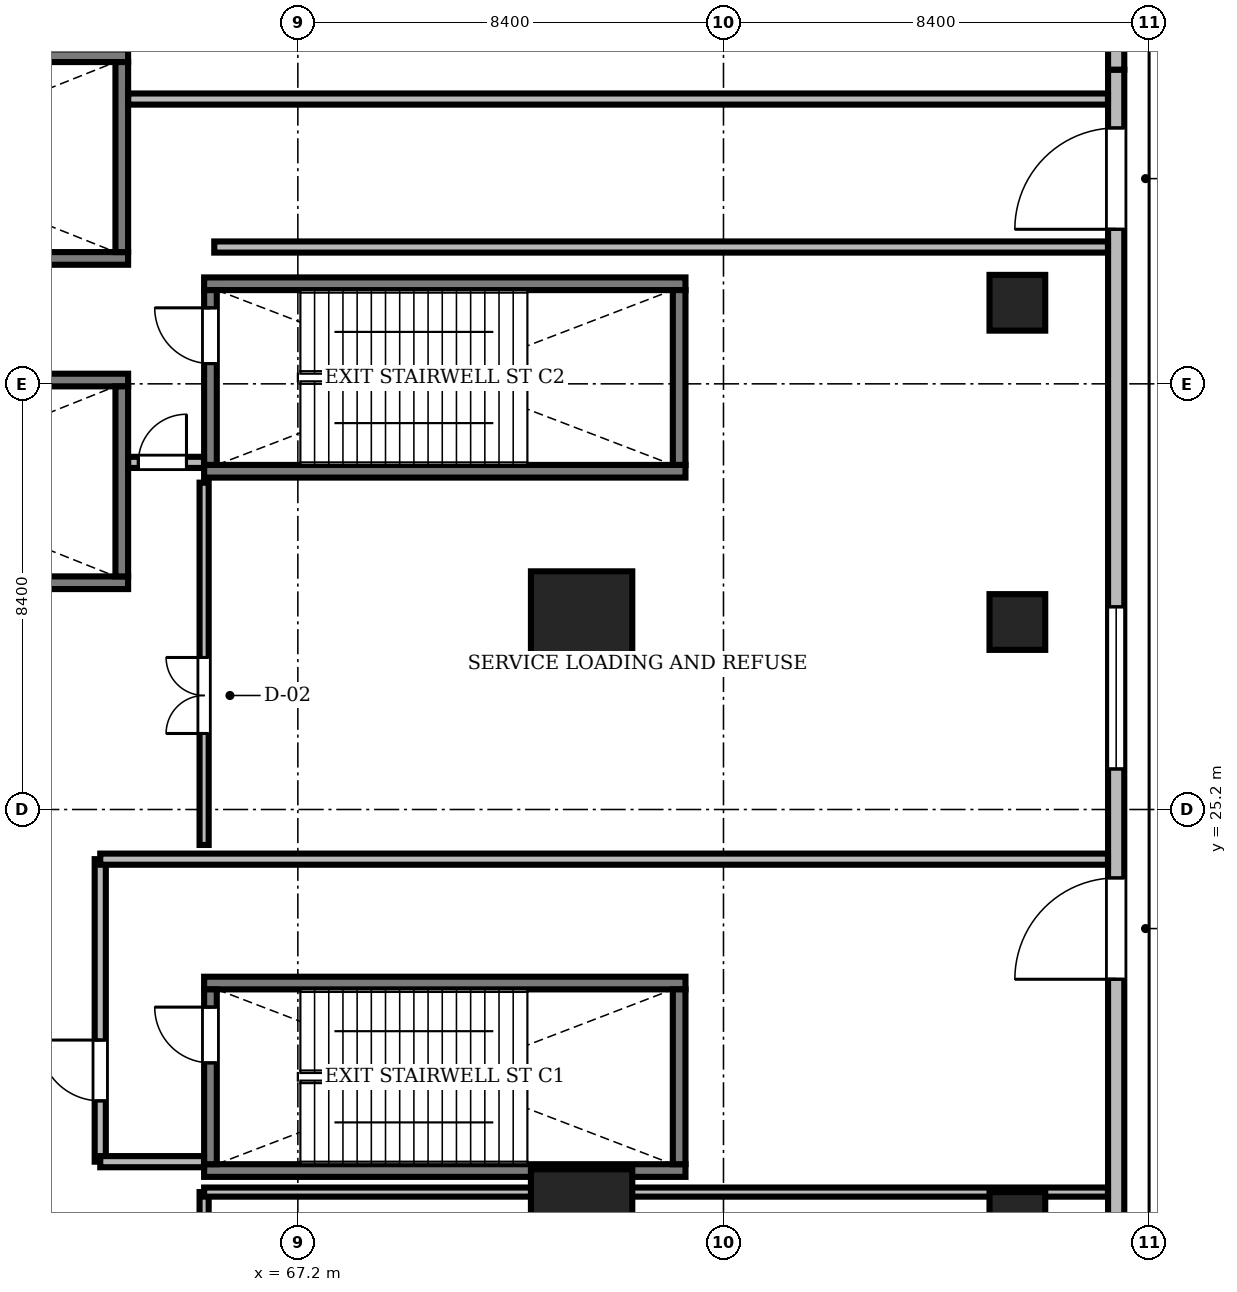
"""IFC4 building model, lengths in metres.
Left out: names, types, materials, properties, quantities, classifications, styles, units other than length and angle.
Written with IfcOpenShell. Run it as: python <this file> out.ifc"""

import sys

from ifc_helpers import new_model, si_unit, direction, frame, frame_2d, origin, origin_2d, place, context, subcontext, project, spatial, rectangle, extrude, source, transform, mapped, element, fill, save


model = new_model("IFC4")
c1 = context("Model", 3, precision=1e-05, world=origin(), true_north=direction((0.0, 1.0)))
c2 = subcontext(c1, "Body", "Model", "MODEL_VIEW")
j1 = project(units=[si_unit("LENGTHUNIT", "METRE"), si_unit("PLANEANGLEUNIT", "RADIAN")], contexts=[c1])
p1 = place(None, origin())
s1 = spatial("IfcSite", under=j1, at=p1, CompositionType="ELEMENT")
p2 = place(p1, origin())
s2 = spatial("IfcBuilding", under=s1, at=p2, CompositionType="ELEMENT")
p3 = place(p2, origin())
s3 = spatial("IfcBuildingStorey", under=s2, at=p3, CompositionType="ELEMENT", Elevation=0.0)
m1 = source(origin(), c2, "Body", "SweptSolid", [
    extrude(rectangle(XDim=2.0, YDim=2.0, at=origin_2d()), origin(), (0.0, 0.0, 1.0), 5.68),
])
for number, where, z_axis, x_axis in (
    (1, (72.8, 17.1, 0.0), (0.0, 0.0, 1.0), (1.0, 0.0, 0.0)),
    (2, (72.8, 28.9, 0.0), (0.0, 0.0, 1.0), (1.0, 0.0, 0.0)),
):
    element("IfcColumn", number, at=place(p3, frame(where, z_axis=z_axis, x_axis=x_axis)), inside=s3, PredefinedType="COLUMN", context=c2, shape_type="MappedRepresentation", body=[
        mapped(m1, transform((0.0, 0.0, 0.0), scale=1.0)),
    ])
m2 = source(origin(), c2, "Body", "SweptSolid", [
    extrude(rectangle(XDim=1.1, YDim=1.1, at=origin_2d()), origin(), (0.0, 0.0, 1.0), 5.68),
])
for number, where, z_axis, x_axis in (
    (3, (81.4, 17.1, 0.0), (0.0, 0.0, 1.0), (1.0, 0.0, 0.0)),
    (4, (81.4, 28.9, 0.0), (0.0, 0.0, 1.0), (1.0, 0.0, 0.0)),
    (5, (81.4, 35.2, 0.0), (0.0, 0.0, 1.0), (1.0, 0.0, 0.0)),
):
    element("IfcColumn", number, at=place(p3, frame(where, z_axis=z_axis, x_axis=x_axis)), inside=s3, PredefinedType="COLUMN", context=c2, shape_type="MappedRepresentation", body=[
        mapped(m2, transform((0.0, 0.0, 0.0), scale=1.0)),
    ])
m3 = source(origin(), c2, "Body", "SweptSolid", [
    extrude(rectangle(XDim=23.4, YDim=0.32, at=frame_2d((11.7, 0.0))), origin(), (0.0, 0.0, 1.0), 5.68),
])
p4 = place(p3, frame((83.35, 16.4, 0.0), z_axis=(0.0, 0.0, 1.0), x_axis=(0.0, 1.0, 0.0)))
e6 = element("IfcWall", 6, at=p4, inside=s3, PredefinedType="SOLIDWALL", context=c2, shape_type="MappedRepresentation", body=[
    mapped(m3, transform((0.0, 0.0, 0.0), scale=1.0)),
])
m4 = source(origin(), c2, "Body", "SweptSolid", [
    extrude(rectangle(XDim=2.0, YDim=2.6, at=frame_2d((1.0, 1.3))), frame((0.0, 0.17, 0.0), z_axis=(0.0, -1.0, 0.0), x_axis=(1.0, 0.0, 0.0)), (0.0, 0.0, 1.0), 0.34),
])
p5 = place(p4, frame((5.45, 0.0, 0.0)))
e7 = element("IfcOpeningElement", 7, at=p5, cuts=e6, PredefinedType="OPENING", context=c2, shape_type="MappedRepresentation", body=[
    mapped(m4, transform((0.0, 0.0, 0.0), scale=1.0)),
])
p6 = place(p4, frame((20.25, 0.0, 0.0)))
e8 = element("IfcOpeningElement", 8, at=p6, cuts=e6, PredefinedType="OPENING", context=c2, shape_type="MappedRepresentation", body=[
    mapped(m4, transform((0.0, 0.0, 0.0), scale=1.0)),
])
m5 = source(origin(), c2, "Body", "SweptSolid", [
    extrude(rectangle(XDim=3.2, YDim=3.4, at=frame_2d((1.6, 1.7))), frame((0.0, 0.17, 0.0), z_axis=(0.0, -1.0, 0.0), x_axis=(1.0, 0.0, 0.0)), (0.0, 0.0, 1.0), 0.34),
])
p7 = place(p4, frame((9.6, 0.0, 0.85)))
e9 = element("IfcOpeningElement", 9, at=p7, cuts=e6, PredefinedType="OPENING", context=c2, shape_type="MappedRepresentation", body=[
    mapped(m5, transform((0.0, 0.0, 0.0), scale=1.0)),
])
m6 = source(origin(), c2, "Body", "SweptSolid", [
    extrude(rectangle(XDim=9.95, YDim=0.32, at=frame_2d((4.975, 0.0))), origin(), (0.0, 0.0, 1.0), 5.68),
])
p8 = place(p3, frame((83.35, 39.8, 0.0), z_axis=(0.0, 0.0, 1.0), x_axis=(0.0, 1.0, 0.0)))
e10 = element("IfcWall", 10, at=p8, inside=s3, PredefinedType="SOLIDWALL", context=c2, shape_type="MappedRepresentation", body=[
    mapped(m6, transform((0.0, 0.0, 0.0), scale=1.0)),
])
m7 = source(origin(), c2, "Body", "SweptSolid", [
    extrude(rectangle(XDim=6.4, YDim=3.2, at=frame_2d((3.2, 1.6))), frame((0.0, 0.17, 0.0), z_axis=(0.0, -1.0, 0.0), x_axis=(1.0, 0.0, 0.0)), (0.0, 0.0, 1.0), 0.34),
])
p9 = place(p8, frame((2.8, 0.0, 0.0)))
e11 = element("IfcOpeningElement", 11, at=p9, cuts=e10, PredefinedType="OPENING", context=c2, shape_type="MappedRepresentation", body=[
    mapped(m7, transform((0.0, 0.0, 0.0), scale=1.0)),
])
m8 = source(origin(), c2, "Body", "SweptSolid", [
    extrude(rectangle(XDim=9.9, YDim=0.25, at=frame_2d((4.95, 0.0))), origin(), (0.0, 0.0, 1.0), 5.8),
])
for number, where, z_axis, x_axis in (
    (12, (53.95, 29.675, 0.0), (0.0, 0.0, 1.0), (1.0, 0.0, 0.0)),
    (13, (53.95, 33.675, 0.0), (0.0, 0.0, 1.0), (1.0, 0.0, 0.0)),
):
    element("IfcWall", number, at=place(p3, frame(where, z_axis=z_axis, x_axis=x_axis)), inside=s3, PredefinedType="SOLIDWALL", context=c2, shape_type="MappedRepresentation", body=[
        mapped(m8, transform((0.0, 0.0, 0.0), scale=1.0)),
    ])
m9 = source(origin(), c2, "Body", "SweptSolid", [
    extrude(rectangle(XDim=3.75, YDim=0.25, at=frame_2d((1.875, 0.0))), origin(), (0.0, 0.0, 1.0), 5.8),
])
p10 = place(p3, frame((63.725, 29.8, 0.0), z_axis=(0.0, 0.0, 1.0), x_axis=(0.0, 1.0, 0.0)))
e14 = element("IfcWall", 14, at=p10, inside=s3, PredefinedType="SOLIDWALL", context=c2, shape_type="MappedRepresentation", body=[
    mapped(m9, transform((0.0, 0.0, 0.0), scale=1.0)),
])
for number, where, z_axis, x_axis in (
    (15, (53.95, 36.075, 0.0), (0.0, 0.0, 1.0), (1.0, 0.0, 0.0)),
    (16, (53.95, 40.075, 0.0), (0.0, 0.0, 1.0), (1.0, 0.0, 0.0)),
):
    element("IfcWall", number, at=place(p3, frame(where, z_axis=z_axis, x_axis=x_axis)), inside=s3, PredefinedType="SOLIDWALL", context=c2, shape_type="MappedRepresentation", body=[
        mapped(m8, transform((0.0, 0.0, 0.0), scale=1.0)),
    ])
p11 = place(p3, frame((63.725, 36.2, 0.0), z_axis=(0.0, 0.0, 1.0), x_axis=(0.0, 1.0, 0.0)))
e17 = element("IfcWall", 17, at=p11, inside=s3, PredefinedType="SOLIDWALL", context=c2, shape_type="MappedRepresentation", body=[
    mapped(m9, transform((0.0, 0.0, 0.0), scale=1.0)),
])
m10 = source(origin(), c2, "Body", "SweptSolid", [
    extrude(rectangle(XDim=9.5, YDim=0.25, at=frame_2d((4.75, 0.0))), origin(), (0.0, 0.0, 1.0), 5.8),
])
for number, where, z_axis, x_axis in (
    (18, (65.35, 18.075, 0.0), (0.0, 0.0, 1.0), (1.0, 0.0, 0.0)),
    (19, (65.35, 21.775, 0.0), (0.0, 0.0, 1.0), (1.0, 0.0, 0.0)),
):
    element("IfcWall", number, at=place(p3, frame(where, z_axis=z_axis, x_axis=x_axis)), inside=s3, PredefinedType="SOLIDWALL", context=c2, shape_type="MappedRepresentation", body=[
        mapped(m10, transform((0.0, 0.0, 0.0), scale=1.0)),
    ])
m11 = source(origin(), c2, "Body", "SweptSolid", [
    extrude(rectangle(XDim=3.45, YDim=0.25, at=frame_2d((1.725, 0.0))), origin(), (0.0, 0.0, 1.0), 5.8),
])
p12 = place(p3, frame((74.725, 18.2, 0.0), z_axis=(0.0, 0.0, 1.0), x_axis=(0.0, 1.0, 0.0)))
e20 = element("IfcWall", 20, at=p12, inside=s3, PredefinedType="SOLIDWALL", context=c2, shape_type="MappedRepresentation", body=[
    mapped(m11, transform((0.0, 0.0, 0.0), scale=1.0)),
])
p13 = place(p3, frame((65.475, 18.2, 0.0), z_axis=(0.0, 0.0, 1.0), x_axis=(0.0, 1.0, 0.0)))
e21 = element("IfcWall", 21, at=p13, inside=s3, PredefinedType="SOLIDWALL", context=c2, shape_type="MappedRepresentation", body=[
    mapped(m11, transform((0.0, 0.0, 0.0), scale=1.0)),
])
m12 = source(origin(), c2, "Body", "SweptSolid", [
    extrude(rectangle(XDim=1.1, YDim=2.2, at=frame_2d((0.55, 1.1))), frame((0.0, 0.135, 0.0), z_axis=(0.0, -1.0, 0.0), x_axis=(1.0, 0.0, 0.0)), (0.0, 0.0, 1.0), 0.27),
])
p14 = place(p13, frame((2.0, 0.0, 0.0)))
e22 = element("IfcOpeningElement", 22, at=p14, cuts=e21, PredefinedType="OPENING", context=c2, shape_type="MappedRepresentation", body=[
    mapped(m12, transform((0.0, 0.0, 0.0), scale=1.0)),
])
for number, where, z_axis, x_axis in (
    (23, (65.35, 31.875, 0.0), (0.0, 0.0, 1.0), (1.0, 0.0, 0.0)),
    (24, (65.35, 35.575, 0.0), (0.0, 0.0, 1.0), (1.0, 0.0, 0.0)),
):
    element("IfcWall", number, at=place(p3, frame(where, z_axis=z_axis, x_axis=x_axis)), inside=s3, PredefinedType="SOLIDWALL", context=c2, shape_type="MappedRepresentation", body=[
        mapped(m10, transform((0.0, 0.0, 0.0), scale=1.0)),
    ])
p15 = place(p3, frame((74.725, 32.0, 0.0), z_axis=(0.0, 0.0, 1.0), x_axis=(0.0, 1.0, 0.0)))
e25 = element("IfcWall", 25, at=p15, inside=s3, PredefinedType="SOLIDWALL", context=c2, shape_type="MappedRepresentation", body=[
    mapped(m11, transform((0.0, 0.0, 0.0), scale=1.0)),
])
p16 = place(p3, frame((65.475, 32.0, 0.0), z_axis=(0.0, 0.0, 1.0), x_axis=(0.0, 1.0, 0.0)))
e26 = element("IfcWall", 26, at=p16, inside=s3, PredefinedType="SOLIDWALL", context=c2, shape_type="MappedRepresentation", body=[
    mapped(m11, transform((0.0, 0.0, 0.0), scale=1.0)),
])
p17 = place(p16, frame((2.0, 0.0, 0.0)))
e27 = element("IfcOpeningElement", 27, at=p17, cuts=e26, PredefinedType="OPENING", context=c2, shape_type="MappedRepresentation", body=[
    mapped(m12, transform((0.0, 0.0, 0.0), scale=1.0)),
])
m13 = source(origin(), c2, "Body", "SweptSolid", [
    extrude(rectangle(XDim=16.7, YDim=0.18, at=frame_2d((8.35, 0.0))), origin(), (0.0, 0.0, 1.0), 5.148),
])
p18 = place(p3, frame((65.35, 0.95, 0.0), z_axis=(0.0, 0.0, 1.0), x_axis=(0.0, 1.0, 0.0)))
e28 = element("IfcWall", 28, at=p18, inside=s3, PredefinedType="PARTITIONING", context=c2, shape_type="MappedRepresentation", body=[
    mapped(m13, transform((0.0, 0.0, 0.0), scale=1.0)),
])
m14 = source(origin(), c2, "Body", "SweptSolid", [
    extrude(rectangle(XDim=1.8, YDim=2.4, at=frame_2d((0.9, 1.2))), frame((0.0, 0.1, 0.0), z_axis=(0.0, -1.0, 0.0), x_axis=(1.0, 0.0, 0.0)), (0.0, 0.0, 1.0), 0.2),
])
p19 = place(p18, frame((5.85, 0.0, 0.0)))
e29 = element("IfcOpeningElement", 29, at=p19, cuts=e28, PredefinedType="OPENING", context=c2, shape_type="MappedRepresentation", body=[
    mapped(m14, transform((0.0, 0.0, 0.0), scale=1.0)),
])
m15 = source(origin(), c2, "Body", "SweptSolid", [
    extrude(rectangle(XDim=7.15, YDim=0.18, at=frame_2d((3.575, 0.0))), origin(), (0.0, 0.0, 1.0), 5.148),
])
p20 = place(p3, frame((65.35, 24.5, 0.0), z_axis=(0.0, 0.0, 1.0), x_axis=(0.0, 1.0, 0.0)))
e30 = element("IfcWall", 30, at=p20, inside=s3, PredefinedType="PARTITIONING", context=c2, shape_type="MappedRepresentation", body=[
    mapped(m15, transform((0.0, 0.0, 0.0), scale=1.0)),
])
m16 = source(origin(), c2, "Body", "SweptSolid", [
    extrude(rectangle(XDim=1.5, YDim=2.3, at=frame_2d((0.75, 1.15))), frame((0.0, 0.1, 0.0), z_axis=(0.0, -1.0, 0.0), x_axis=(1.0, 0.0, 0.0)), (0.0, 0.0, 1.0), 0.2),
])
p21 = place(p20, frame((2.2, 0.0, 0.0)))
e31 = element("IfcOpeningElement", 31, at=p21, cuts=e30, PredefinedType="OPENING", context=c2, shape_type="MappedRepresentation", body=[
    mapped(m16, transform((0.0, 0.0, 0.0), scale=1.0)),
])
m17 = source(origin(), c2, "Body", "SweptSolid", [
    extrude(rectangle(XDim=5.97, YDim=0.22, at=frame_2d((2.985, 0.0))), origin(), (0.0, 0.0, 1.0), 5.68),
])
p22 = place(p3, frame((63.3, 18.25, 0.0), z_axis=(0.0, 0.0, 1.0), x_axis=(0.0, 1.0, 0.0)))
e32 = element("IfcWall", 32, at=p22, inside=s3, PredefinedType="SOLIDWALL", context=c2, shape_type="MappedRepresentation", body=[
    mapped(m17, transform((0.0, 0.0, 0.0), scale=1.0)),
])
m18 = source(origin(), c2, "Body", "SweptSolid", [
    extrude(rectangle(XDim=1.2, YDim=2.2, at=frame_2d((0.6, 1.1))), frame((0.0, 0.12, 0.0), z_axis=(0.0, -1.0, 0.0), x_axis=(1.0, 0.0, 0.0)), (0.0, 0.0, 1.0), 0.24),
])
p23 = place(p22, frame((1.2, 0.0, 0.0)))
e33 = element("IfcOpeningElement", 33, at=p23, cuts=e32, PredefinedType="OPENING", context=c2, shape_type="MappedRepresentation", body=[
    mapped(m18, transform((0.0, 0.0, 0.0), scale=1.0)),
])
m19 = source(origin(), c2, "Body", "SweptSolid", [
    extrude(rectangle(XDim=1.496, YDim=0.22, at=frame_2d((0.748, 0.0))), origin(), (0.0, 0.0, 1.0), 5.68),
])
p24 = place(p3, frame((63.852, 32.05, 0.0), z_axis=(0.0, 0.0, 1.0), x_axis=(1.0, 0.0, 0.0)))
e34 = element("IfcWall", 34, at=p24, inside=s3, PredefinedType="SOLIDWALL", context=c2, shape_type="MappedRepresentation", body=[
    mapped(m19, transform((0.0, 0.0, 0.0), scale=1.0)),
])
m20 = source(origin(), c2, "Body", "SweptSolid", [
    extrude(rectangle(XDim=0.95, YDim=2.15, at=frame_2d((0.475, 1.075))), frame((0.0, 0.12, 0.0), z_axis=(0.0, -1.0, 0.0), x_axis=(1.0, 0.0, 0.0)), (0.0, 0.0, 1.0), 0.24),
])
p25 = place(p24, frame((0.2, 0.0, 0.0)))
e35 = element("IfcOpeningElement", 35, at=p25, cuts=e34, PredefinedType="OPENING", context=c2, shape_type="MappedRepresentation", body=[
    mapped(m20, transform((0.0, 0.0, 0.0), scale=1.0)),
])
m21 = source(origin(), c2, "Body", "SweptSolid", [
    extrude(rectangle(XDim=19.888, YDim=0.22, at=frame_2d((9.944, 0.0))), origin(), (0.0, 0.0, 1.0), 5.072),
])
p26 = place(p3, frame((63.3, 24.22, 0.0), z_axis=(0.0, 0.0, 1.0), x_axis=(1.0, 0.0, 0.0)))
e36 = element("IfcWall", 36, at=p26, inside=s3, PredefinedType="SOLIDWALL", context=c2, shape_type="MappedRepresentation", body=[
    mapped(m21, transform((0.0, 0.0, 0.0), scale=1.0)),
])
m22 = source(origin(), c2, "Body", "SweptSolid", [
    extrude(rectangle(XDim=19.336, YDim=0.22, at=frame_2d((9.668, 0.0))), origin(), (0.0, 0.0, 1.0), 5.072),
])
p27 = place(p3, frame((63.852, 39.22, 0.0), z_axis=(0.0, 0.0, 1.0), x_axis=(1.0, 0.0, 0.0)))
e37 = element("IfcWall", 37, at=p27, inside=s3, PredefinedType="SOLIDWALL", context=c2, shape_type="MappedRepresentation", body=[
    mapped(m22, transform((0.0, 0.0, 0.0), scale=1.0)),
])
m23 = source(origin(), c2, "Body", "SweptSolid", [
    extrude(rectangle(XDim=17.838, YDim=0.18, at=frame_2d((8.919, 0.0))), origin(), (0.0, 0.0, 1.0), 5.072),
])
p28 = place(p3, frame((65.35, 17.65, 0.0), z_axis=(0.0, 0.0, 1.0), x_axis=(1.0, 0.0, 0.0)))
e38 = element("IfcWall", 38, at=p28, inside=s3, PredefinedType="PARTITIONING", context=c2, shape_type="MappedRepresentation", body=[
    mapped(m23, transform((0.0, 0.0, 0.0), scale=1.0)),
])
m24 = source(origin(), c2, "Body", "SweptSolid", [
    extrude(rectangle(XDim=17.638, YDim=0.22, at=frame_2d((8.819, 0.0))), origin(), (0.0, 0.0, 1.0), 5.072),
])
p29 = place(p3, frame((65.55, 36.3, 0.0), z_axis=(0.0, 0.0, 1.0), x_axis=(1.0, 0.0, 0.0)))
e39 = element("IfcWall", 39, at=p29, inside=s3, PredefinedType="SOLIDWALL", context=c2, shape_type="MappedRepresentation", body=[
    mapped(m24, transform((0.0, 0.0, 0.0), scale=1.0)),
])
m25 = source(origin(), c2, "Body", "SweptSolid", [
    extrude(rectangle(XDim=2.048, YDim=0.22, at=frame_2d((1.024, 0.0))), origin(), (0.0, 0.0, 1.0), 5.68),
])
p30 = place(p3, frame((63.3, 18.25, 0.0), z_axis=(0.0, 0.0, 1.0), x_axis=(1.0, 0.0, 0.0)))
e40 = element("IfcWall", 40, at=p30, inside=s3, PredefinedType="SOLIDWALL", context=c2, shape_type="MappedRepresentation", body=[
    mapped(m25, transform((0.0, 0.0, 0.0), scale=1.0)),
])
m26 = source(origin(), c2, "Body", "SweptSolid", [
    extrude(rectangle(XDim=2.0, YDim=2.6, at=frame_2d((1.0, 1.3))), frame((0.0, 0.025, 0.0), z_axis=(0.0, -1.0, 0.0), x_axis=(1.0, 0.0, 0.0)), (0.0, 0.0, 1.0), 0.05),
])
p31 = place(p5, frame((2.0, 0.0, 0.0), z_axis=(0.0, 0.0, 1.0), x_axis=(-1.0, 0.0, 0.0)))
e41 = element("IfcDoor", 41, at=p31, inside=s3, OperationType="DOUBLE_DOOR_SINGLE_SWING", PredefinedType="DOOR", context=c2, shape_type="MappedRepresentation", body=[
    mapped(m26, transform((0.0, 0.0, 0.0), scale=1.0)),
])
fill(e7, e41)
p32 = place(p6, frame((2.0, 0.0, 0.0), z_axis=(0.0, 0.0, 1.0), x_axis=(-1.0, 0.0, 0.0)))
e42 = element("IfcDoor", 42, at=p32, inside=s3, OperationType="DOUBLE_DOOR_SINGLE_SWING", PredefinedType="DOOR", context=c2, shape_type="MappedRepresentation", body=[
    mapped(m26, transform((0.0, 0.0, 0.0), scale=1.0)),
])
fill(e8, e42)
m27 = source(origin(), c2, "Body", "SweptSolid", [
    extrude(rectangle(XDim=3.2, YDim=3.4, at=frame_2d((1.6, 1.7))), frame((0.0, 0.03, 0.0), z_axis=(0.0, -1.0, 0.0), x_axis=(1.0, 0.0, 0.0)), (0.0, 0.0, 1.0), 0.06),
])
p33 = place(p7, origin())
e43 = element("IfcWindow", 43, at=p33, inside=s3, PartitioningType="SINGLE_PANEL", PredefinedType="WINDOW", context=c2, shape_type="MappedRepresentation", body=[
    mapped(m27, transform((0.0, 0.0, 0.0), scale=1.0)),
])
fill(e9, e43)
m28 = source(origin(), c2, "Body", "SweptSolid", [
    extrude(rectangle(XDim=1.1, YDim=2.2, at=frame_2d((0.55, 1.1))), frame((0.0, 0.025, 0.0), z_axis=(0.0, -1.0, 0.0), x_axis=(1.0, 0.0, 0.0)), (0.0, 0.0, 1.0), 0.05),
])
p34 = place(p14, origin())
e44 = element("IfcDoor", 44, at=p34, inside=s3, OperationType="SINGLE_SWING_RIGHT", PredefinedType="DOOR", context=c2, shape_type="MappedRepresentation", body=[
    mapped(m28, transform((0.0, 0.0, 0.0), scale=1.0)),
])
fill(e22, e44)
p35 = place(p17, origin())
e45 = element("IfcDoor", 45, at=p35, inside=s3, OperationType="SINGLE_SWING_RIGHT", PredefinedType="DOOR", context=c2, shape_type="MappedRepresentation", body=[
    mapped(m28, transform((0.0, 0.0, 0.0), scale=1.0)),
])
fill(e27, e45)
m29 = source(origin(), c2, "Body", "SweptSolid", [
    extrude(rectangle(XDim=1.5, YDim=2.3, at=frame_2d((0.75, 1.15))), frame((0.0, 0.025, 0.0), z_axis=(0.0, -1.0, 0.0), x_axis=(1.0, 0.0, 0.0)), (0.0, 0.0, 1.0), 0.05),
])
p36 = place(p21, origin())
e46 = element("IfcDoor", 46, at=p36, inside=s3, OperationType="DOUBLE_DOOR_SINGLE_SWING", PredefinedType="DOOR", context=c2, shape_type="MappedRepresentation", body=[
    mapped(m29, transform((0.0, 0.0, 0.0), scale=1.0)),
])
fill(e31, e46)
m30 = source(origin(), c2, "Body", "SweptSolid", [
    extrude(rectangle(XDim=1.2, YDim=2.2, at=frame_2d((0.6, 1.1))), frame((0.0, 0.025, 0.0), z_axis=(0.0, -1.0, 0.0), x_axis=(1.0, 0.0, 0.0)), (0.0, 0.0, 1.0), 0.05),
])
p37 = place(p23, origin())
e47 = element("IfcDoor", 47, at=p37, inside=s3, OperationType="SINGLE_SWING_RIGHT", PredefinedType="DOOR", context=c2, shape_type="MappedRepresentation", body=[
    mapped(m30, transform((0.0, 0.0, 0.0), scale=1.0)),
])
fill(e33, e47)
m31 = source(origin(), c2, "Body", "SweptSolid", [
    extrude(rectangle(XDim=0.95, YDim=2.15, at=frame_2d((0.475, 1.075))), frame((0.0, 0.025, 0.0), z_axis=(0.0, -1.0, 0.0), x_axis=(1.0, 0.0, 0.0)), (0.0, 0.0, 1.0), 0.05),
])
p38 = place(p25, origin())
e48 = element("IfcDoor", 48, at=p38, inside=s3, OperationType="SINGLE_SWING_RIGHT", PredefinedType="DOOR", context=c2, shape_type="MappedRepresentation", body=[
    mapped(m31, transform((0.0, 0.0, 0.0), scale=1.0)),
])
fill(e35, e48)
save(model, sys.argv[1])
